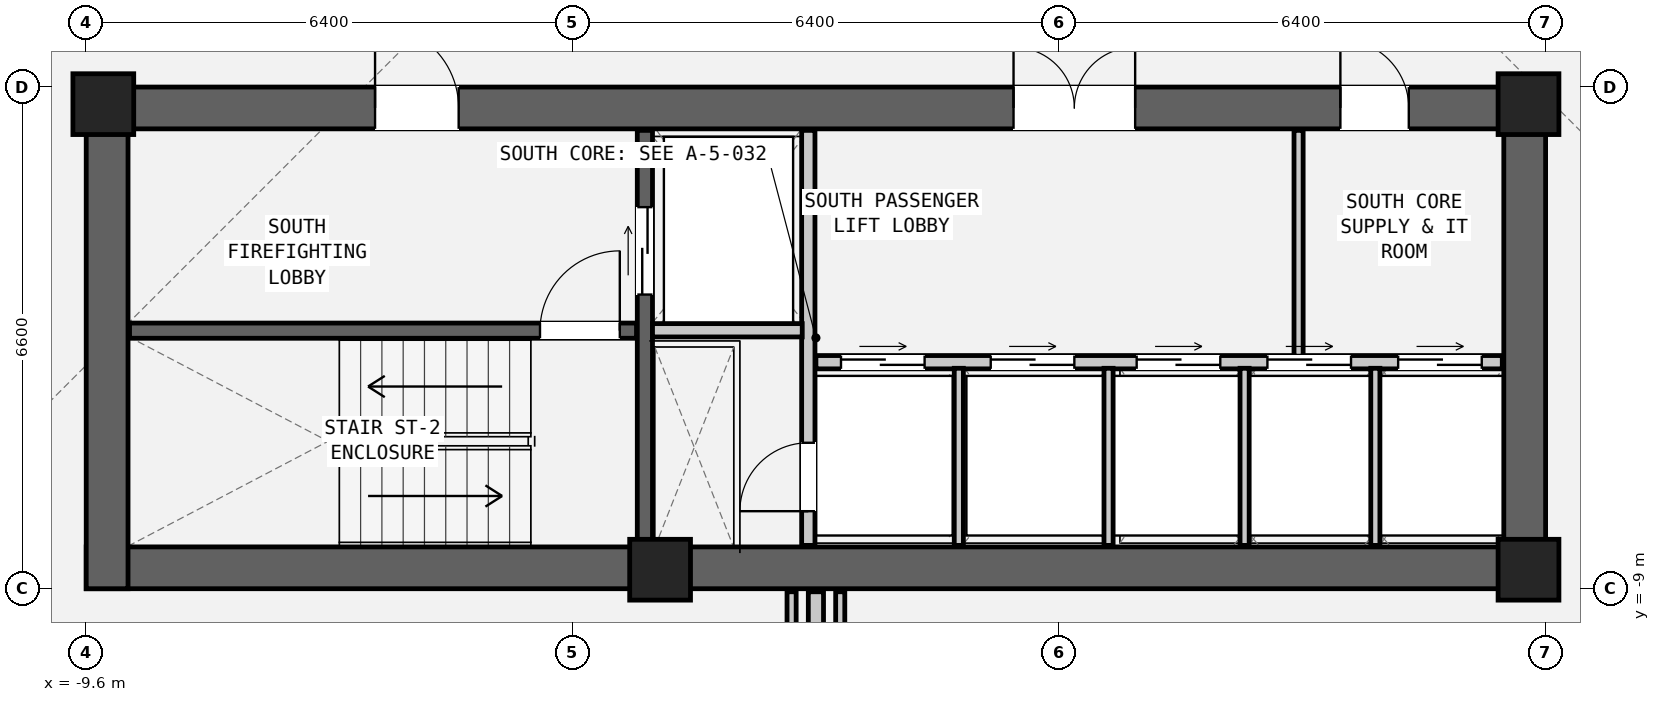
"""IFC4 building model, lengths in metres.
Left out: names, types, materials, properties, quantities, classifications, styles, units other than length and angle.
Written with IfcOpenShell. Run it as: python <this file> out.ifc"""

import sys

from ifc_helpers import new_model, si_unit, direction, frame, frame_2d, origin, origin_2d, place, context, subcontext, project, spatial, rectangle, extrude, element, fill, save


model = new_model("IFC4")
c1 = context("Model", 3, precision=1e-05, world=origin(), true_north=direction((0.0, 1.0)))
c2 = subcontext(c1, "Body", "Model", "MODEL_VIEW")
j1 = project(units=[si_unit("LENGTHUNIT", "METRE"), si_unit("PLANEANGLEUNIT", "RADIAN")], contexts=[c1])
p1 = place(None, origin())
s1 = spatial("IfcSite", under=j1, at=p1, CompositionType="ELEMENT")
p2 = place(p1, origin())
s2 = spatial("IfcBuilding", under=s1, at=p2, CompositionType="ELEMENT")
p3 = place(p2, frame((0.0, 0.0, 101.25)))
s3 = spatial("IfcBuildingStorey", under=s2, at=p3, CompositionType="ELEMENT", Elevation=101.25)
p4 = place(p3, frame((-9.6, -8.725, 0.0), z_axis=(0.0, 0.0, 1.0), x_axis=(1.0, 0.0, 0.0)))
e1 = element("IfcWall", 1, at=p4, inside=s3, PredefinedType="SHEAR", context=c2, shape_type="SweptSolid", body=[
    extrude(rectangle(XDim=19.2, YDim=0.55, at=frame_2d((9.6, 0.0))), origin(), (0.0, 0.0, 1.0), 3.6),
])
p5 = place(p3, frame((-9.6, -2.675, 0.0), z_axis=(0.0, 0.0, 1.0), x_axis=(1.0, 0.0, 0.0)))
e2 = element("IfcWall", 2, at=p5, inside=s3, PredefinedType="SHEAR", context=c2, shape_type="SweptSolid", body=[
    extrude(rectangle(XDim=19.2, YDim=0.55, at=frame_2d((9.6, 0.0))), origin(), (0.0, 0.0, 1.0), 3.6),
])
p6 = place(p5, frame((3.8, 0.0, 0.0)))
e3 = element("IfcOpeningElement", 3, at=p6, cuts=e2, PredefinedType="OPENING", context=c2, shape_type="SweptSolid", body=[
    extrude(rectangle(XDim=1.1, YDim=2.08, at=frame_2d((0.55, 1.04))), frame((0.0, 0.287, 0.0), z_axis=(0.0, -1.0, 0.0), x_axis=(1.0, 0.0, 0.0)), (0.0, 0.0, 1.0), 0.574),
])
p7 = place(p5, frame((12.2, 0.0, 0.0)))
e4 = element("IfcOpeningElement", 4, at=p7, cuts=e2, PredefinedType="OPENING", context=c2, shape_type="SweptSolid", body=[
    extrude(rectangle(XDim=1.6, YDim=2.12, at=frame_2d((0.8, 1.06))), frame((0.0, 0.287, 0.0), z_axis=(0.0, -1.0, 0.0), x_axis=(1.0, 0.0, 0.0)), (0.0, 0.0, 1.0), 0.574),
])
p8 = place(p5, frame((16.5, 0.0, 0.0)))
e5 = element("IfcOpeningElement", 5, at=p8, cuts=e2, PredefinedType="OPENING", context=c2, shape_type="SweptSolid", body=[
    extrude(rectangle(XDim=0.9, YDim=2.05, at=frame_2d((0.45, 1.025))), frame((0.0, 0.287, 0.0), z_axis=(0.0, -1.0, 0.0), x_axis=(1.0, 0.0, 0.0)), (0.0, 0.0, 1.0), 0.574),
])
for number, where, z_axis, x_axis in (
    (6, (-9.325, -9.0, 0.0), (0.0, 0.0, 1.0), (0.0, 1.0, 0.0)),
    (7, (9.325, -9.0, 0.0), (0.0, 0.0, 1.0), (0.0, 1.0, 0.0)),
):
    element("IfcWall", number, at=place(p3, frame(where, z_axis=z_axis, x_axis=x_axis)), inside=s3, PredefinedType="SHEAR", context=c2, shape_type="SweptSolid", body=[
        extrude(rectangle(XDim=6.6, YDim=0.55, at=frame_2d((3.3, 0.0))), origin(), (0.0, 0.0, 1.0), 3.6),
    ])
for number, where, z_axis, x_axis in (
    (8, (-9.375, -2.625, 0.0), (0.0, 0.0, 1.0), (1.0, 0.0, 0.0)),
    (9, (9.375, -2.625, 0.0), (0.0, 0.0, 1.0), (1.0, 0.0, 0.0)),
    (10, (-2.05, -8.75, 0.0), (0.0, 0.0, 1.0), (1.0, 0.0, 0.0)),
    (11, (9.375, -8.75, 0.0), (0.0, 0.0, 1.0), (1.0, 0.0, 0.0)),
):
    element("IfcColumn", number, at=place(p3, frame(where, z_axis=z_axis, x_axis=x_axis)), inside=s3, PredefinedType="COLUMN", context=c2, shape_type="SweptSolid", body=[
        extrude(rectangle(XDim=0.8, YDim=0.8, at=origin_2d()), origin(), (0.0, 0.0, 1.0), 3.6),
    ])
p9 = place(p3, frame((-9.03, -5.605, 0.0), z_axis=(0.0, 0.0, 1.0), x_axis=(1.0, 0.0, 0.0)))
e12 = element("IfcWall", 12, at=p9, inside=s3, PredefinedType="SHEAR", context=c2, shape_type="SweptSolid", body=[
    extrude(rectangle(XDim=6.67, YDim=0.2, at=frame_2d((3.335, 0.0))), origin(), (0.0, 0.0, 1.0), 3.22),
])
p10 = place(p9, frame((5.4, 0.0, 0.0)))
e13 = element("IfcOpeningElement", 13, at=p10, cuts=e12, PredefinedType="OPENING", context=c2, shape_type="SweptSolid", body=[
    extrude(rectangle(XDim=1.05, YDim=2.08, at=frame_2d((0.525, 1.04))), frame((0.0, 0.112, 0.0), z_axis=(0.0, -1.0, 0.0), x_axis=(1.0, 0.0, 0.0)), (0.0, 0.0, 1.0), 0.224),
])
p11 = place(p3, frame((-2.25, -8.43, 0.0), z_axis=(0.0, 0.0, 1.0), x_axis=(0.0, 1.0, 0.0)))
e14 = element("IfcWall", 14, at=p11, inside=s3, PredefinedType="SHEAR", context=c2, shape_type="SweptSolid", body=[
    extrude(rectangle(XDim=5.46, YDim=0.2, at=frame_2d((2.73, 0.0))), origin(), (0.0, 0.0, 1.0), 3.22),
])
p12 = place(p11, frame((3.3, 0.0, 0.0)))
e15 = element("IfcOpeningElement", 15, at=p12, cuts=e14, PredefinedType="OPENING", context=c2, shape_type="SweptSolid", body=[
    extrude(rectangle(XDim=1.15, YDim=2.08, at=frame_2d((0.575, 1.04))), frame((0.0, 0.112, 0.0), z_axis=(0.0, -1.0, 0.0), x_axis=(1.0, 0.0, 0.0)), (0.0, 0.0, 1.0), 0.224),
])
p13 = place(p3, frame((-0.1, -8.43, 0.0), z_axis=(0.0, 0.0, 1.0), x_axis=(0.0, 1.0, 0.0)))
e16 = element("IfcWall", 16, at=p13, inside=s3, PredefinedType="PARTITIONING", context=c2, shape_type="SweptSolid", body=[
    extrude(rectangle(XDim=5.46, YDim=0.175, at=frame_2d((2.73, 0.0))), origin(), (0.0, 0.0, 1.0), 3.22),
])
p14 = place(p13, frame((0.45, 0.0, 0.0)))
e17 = element("IfcOpeningElement", 17, at=p14, cuts=e16, PredefinedType="OPENING", context=c2, shape_type="SweptSolid", body=[
    extrude(rectangle(XDim=0.9, YDim=2.05, at=frame_2d((0.45, 1.025))), frame((0.0, 0.1, 0.0), z_axis=(0.0, -1.0, 0.0), x_axis=(1.0, 0.0, 0.0)), (0.0, 0.0, 1.0), 0.199),
])
p15 = place(p3, frame((-2.15, -5.6, 0.0), z_axis=(0.0, 0.0, 1.0), x_axis=(1.0, 0.0, 0.0)))
e18 = element("IfcWall", 18, at=p15, inside=s3, PredefinedType="PARTITIONING", context=c2, shape_type="SweptSolid", body=[
    extrude(rectangle(XDim=1.97, YDim=0.175, at=frame_2d((0.985, 0.0))), origin(), (0.0, 0.0, 1.0), 3.22),
])
p16 = place(p3, frame((0.0, -6.02, 0.0), z_axis=(0.0, 0.0, 1.0), x_axis=(1.0, 0.0, 0.0)))
e19 = element("IfcWall", 19, at=p16, inside=s3, PredefinedType="PARTITIONING", context=c2, shape_type="SweptSolid", body=[
    extrude(rectangle(XDim=9.03, YDim=0.175, at=frame_2d((4.515, 0.0))), origin(), (0.0, 0.0, 1.0), 3.22),
])
p17 = place(p16, frame((0.33, 0.0, 0.0)))
e20 = element("IfcOpeningElement", 20, at=p17, cuts=e19, PredefinedType="OPENING", context=c2, shape_type="SweptSolid", body=[
    extrude(rectangle(XDim=1.1, YDim=2.06, at=frame_2d((0.55, 1.03))), frame((0.0, 0.1, 0.0), z_axis=(0.0, -1.0, 0.0), x_axis=(1.0, 0.0, 0.0)), (0.0, 0.0, 1.0), 0.199),
])
p18 = place(p16, frame((2.3, 0.0, 0.0)))
e21 = element("IfcOpeningElement", 21, at=p18, cuts=e19, PredefinedType="OPENING", context=c2, shape_type="SweptSolid", body=[
    extrude(rectangle(XDim=1.1, YDim=2.06, at=frame_2d((0.55, 1.03))), frame((0.0, 0.1, 0.0), z_axis=(0.0, -1.0, 0.0), x_axis=(1.0, 0.0, 0.0)), (0.0, 0.0, 1.0), 0.199),
])
p19 = place(p16, frame((4.22, 0.0, 0.0)))
e22 = element("IfcOpeningElement", 22, at=p19, cuts=e19, PredefinedType="OPENING", context=c2, shape_type="SweptSolid", body=[
    extrude(rectangle(XDim=1.1, YDim=2.06, at=frame_2d((0.55, 1.03))), frame((0.0, 0.1, 0.0), z_axis=(0.0, -1.0, 0.0), x_axis=(1.0, 0.0, 0.0)), (0.0, 0.0, 1.0), 0.199),
])
p20 = place(p16, frame((5.94, 0.0, 0.0)))
e23 = element("IfcOpeningElement", 23, at=p20, cuts=e19, PredefinedType="OPENING", context=c2, shape_type="SweptSolid", body=[
    extrude(rectangle(XDim=1.1, YDim=2.06, at=frame_2d((0.55, 1.03))), frame((0.0, 0.1, 0.0), z_axis=(0.0, -1.0, 0.0), x_axis=(1.0, 0.0, 0.0)), (0.0, 0.0, 1.0), 0.199),
])
p21 = place(p16, frame((7.66, 0.0, 0.0)))
e24 = element("IfcOpeningElement", 24, at=p21, cuts=e19, PredefinedType="OPENING", context=c2, shape_type="SweptSolid", body=[
    extrude(rectangle(XDim=1.1, YDim=2.06, at=frame_2d((0.55, 1.03))), frame((0.0, 0.1, 0.0), z_axis=(0.0, -1.0, 0.0), x_axis=(1.0, 0.0, 0.0)), (0.0, 0.0, 1.0), 0.199),
])
for number, where, z_axis, x_axis in (
    (25, (1.88, -8.43, 0.0), (0.0, 0.0, 1.0), (0.0, 1.0, 0.0)),
    (26, (3.85, -8.43, 0.0), (0.0, 0.0, 1.0), (0.0, 1.0, 0.0)),
    (27, (5.64, -8.43, 0.0), (0.0, 0.0, 1.0), (0.0, 1.0, 0.0)),
    (28, (7.36, -8.43, 0.0), (0.0, 0.0, 1.0), (0.0, 1.0, 0.0)),
):
    element("IfcWall", number, at=place(p3, frame(where, z_axis=z_axis, x_axis=x_axis)), inside=s3, PredefinedType="PARTITIONING", context=c2, shape_type="SweptSolid", body=[
        extrude(rectangle(XDim=2.33, YDim=0.12, at=frame_2d((1.165, 0.0))), origin(), (0.0, 0.0, 1.0), 3.22),
    ])
p22 = place(p3, frame((6.35, -5.94, 0.0), z_axis=(0.0, 0.0, 1.0), x_axis=(0.0, 1.0, 0.0)))
e29 = element("IfcWall", 29, at=p22, inside=s3, PredefinedType="PARTITIONING", context=c2, shape_type="SweptSolid", body=[
    extrude(rectangle(XDim=2.97, YDim=0.12, at=frame_2d((1.485, 0.0))), origin(), (0.0, 0.0, 1.0), 3.22),
])
p23 = place(p3, frame((0.0, -14.17, 0.0), z_axis=(0.0, 0.0, 1.0), x_axis=(0.0, 1.0, 0.0)))
e30 = element("IfcWall", 30, at=p23, inside=s3, PredefinedType="PARTITIONING", context=c2, shape_type="SweptSolid", body=[
    extrude(rectangle(XDim=5.13, YDim=0.2, at=frame_2d((2.565, 0.0))), origin(), (0.0, 0.0, 1.0), 2.741),
])
for number, where, z_axis, x_axis in (
    (31, (-0.32, -11.4, 0.0), (0.0, 0.0, 1.0), (0.0, 1.0, 0.0)),
    (32, (0.32, -11.4, 0.0), (0.0, 0.0, 1.0), (0.0, 1.0, 0.0)),
):
    element("IfcWall", number, at=place(p3, frame(where, z_axis=z_axis, x_axis=x_axis)), inside=s3, PredefinedType="PARTITIONING", context=c2, shape_type="SweptSolid", body=[
        extrude(rectangle(XDim=2.36, YDim=0.12, at=frame_2d((1.18, 0.0))), origin(), (0.0, 0.0, 1.0), 2.741),
    ])
p24 = place(p10, origin())
e33 = element("IfcDoor", 33, at=p24, inside=s3, OperationType="SINGLE_SWING_RIGHT", PredefinedType="DOOR", context=c2, shape_type="SweptSolid", body=[
    extrude(rectangle(XDim=1.05, YDim=2.08, at=frame_2d((0.525, 1.04))), frame((0.0, 0.025, 0.0), z_axis=(0.0, -1.0, 0.0), x_axis=(1.0, 0.0, 0.0)), (0.0, 0.0, 1.0), 0.05),
])
fill(e13, e33)
p25 = place(p6, origin())
e34 = element("IfcDoor", 34, at=p25, inside=s3, OperationType="SINGLE_SWING_LEFT", PredefinedType="DOOR", context=c2, shape_type="SweptSolid", body=[
    extrude(rectangle(XDim=1.1, YDim=2.08, at=frame_2d((0.55, 1.04))), frame((0.0, 0.025, 0.0), z_axis=(0.0, -1.0, 0.0), x_axis=(1.0, 0.0, 0.0)), (0.0, 0.0, 1.0), 0.05),
])
fill(e3, e34)
p26 = place(p12, origin())
e35 = element("IfcDoor", 35, at=p26, inside=s3, OperationType="DOUBLE_DOOR_SLIDING", PredefinedType="DOOR", context=c2, shape_type="SweptSolid", body=[
    extrude(rectangle(XDim=1.15, YDim=2.08, at=frame_2d((0.575, 1.04))), frame((0.0, 0.025, 0.0), z_axis=(0.0, -1.0, 0.0), x_axis=(1.0, 0.0, 0.0)), (0.0, 0.0, 1.0), 0.05),
])
fill(e15, e35)
p27 = place(p14, origin())
e36 = element("IfcDoor", 36, at=p27, inside=s3, OperationType="SINGLE_SWING_LEFT", PredefinedType="DOOR", context=c2, shape_type="SweptSolid", body=[
    extrude(rectangle(XDim=0.9, YDim=2.05, at=frame_2d((0.45, 1.025))), frame((0.0, 0.025, 0.0), z_axis=(0.0, -1.0, 0.0), x_axis=(1.0, 0.0, 0.0)), (0.0, 0.0, 1.0), 0.05),
])
fill(e17, e36)
p28 = place(p7, origin())
e37 = element("IfcDoor", 37, at=p28, inside=s3, OperationType="DOUBLE_DOOR_SINGLE_SWING", PredefinedType="DOOR", context=c2, shape_type="SweptSolid", body=[
    extrude(rectangle(XDim=1.6, YDim=2.12, at=frame_2d((0.8, 1.06))), frame((0.0, 0.025, 0.0), z_axis=(0.0, -1.0, 0.0), x_axis=(1.0, 0.0, 0.0)), (0.0, 0.0, 1.0), 0.05),
])
fill(e4, e37)
p29 = place(p8, origin())
e38 = element("IfcDoor", 38, at=p29, inside=s3, OperationType="SINGLE_SWING_LEFT", PredefinedType="DOOR", context=c2, shape_type="SweptSolid", body=[
    extrude(rectangle(XDim=0.9, YDim=2.05, at=frame_2d((0.45, 1.025))), frame((0.0, 0.025, 0.0), z_axis=(0.0, -1.0, 0.0), x_axis=(1.0, 0.0, 0.0)), (0.0, 0.0, 1.0), 0.05),
])
fill(e5, e38)
p30 = place(p17, origin())
e39 = element("IfcDoor", 39, at=p30, inside=s3, OperationType="DOUBLE_DOOR_SLIDING", PredefinedType="DOOR", context=c2, shape_type="SweptSolid", body=[
    extrude(rectangle(XDim=1.1, YDim=2.06, at=frame_2d((0.55, 1.03))), frame((0.0, 0.025, 0.0), z_axis=(0.0, -1.0, 0.0), x_axis=(1.0, 0.0, 0.0)), (0.0, 0.0, 1.0), 0.05),
])
fill(e20, e39)
p31 = place(p18, origin())
e40 = element("IfcDoor", 40, at=p31, inside=s3, OperationType="DOUBLE_DOOR_SLIDING", PredefinedType="DOOR", context=c2, shape_type="SweptSolid", body=[
    extrude(rectangle(XDim=1.1, YDim=2.06, at=frame_2d((0.55, 1.03))), frame((0.0, 0.025, 0.0), z_axis=(0.0, -1.0, 0.0), x_axis=(1.0, 0.0, 0.0)), (0.0, 0.0, 1.0), 0.05),
])
fill(e21, e40)
p32 = place(p19, origin())
e41 = element("IfcDoor", 41, at=p32, inside=s3, OperationType="DOUBLE_DOOR_SLIDING", PredefinedType="DOOR", context=c2, shape_type="SweptSolid", body=[
    extrude(rectangle(XDim=1.1, YDim=2.06, at=frame_2d((0.55, 1.03))), frame((0.0, 0.025, 0.0), z_axis=(0.0, -1.0, 0.0), x_axis=(1.0, 0.0, 0.0)), (0.0, 0.0, 1.0), 0.05),
])
fill(e22, e41)
p33 = place(p20, origin())
e42 = element("IfcDoor", 42, at=p33, inside=s3, OperationType="DOUBLE_DOOR_SLIDING", PredefinedType="DOOR", context=c2, shape_type="SweptSolid", body=[
    extrude(rectangle(XDim=1.1, YDim=2.06, at=frame_2d((0.55, 1.03))), frame((0.0, 0.025, 0.0), z_axis=(0.0, -1.0, 0.0), x_axis=(1.0, 0.0, 0.0)), (0.0, 0.0, 1.0), 0.05),
])
fill(e23, e42)
p34 = place(p21, origin())
e43 = element("IfcDoor", 43, at=p34, inside=s3, OperationType="DOUBLE_DOOR_SLIDING", PredefinedType="DOOR", context=c2, shape_type="SweptSolid", body=[
    extrude(rectangle(XDim=1.1, YDim=2.06, at=frame_2d((0.55, 1.03))), frame((0.0, 0.025, 0.0), z_axis=(0.0, -1.0, 0.0), x_axis=(1.0, 0.0, 0.0)), (0.0, 0.0, 1.0), 0.05),
])
fill(e24, e43)
save(model, sys.argv[1])
